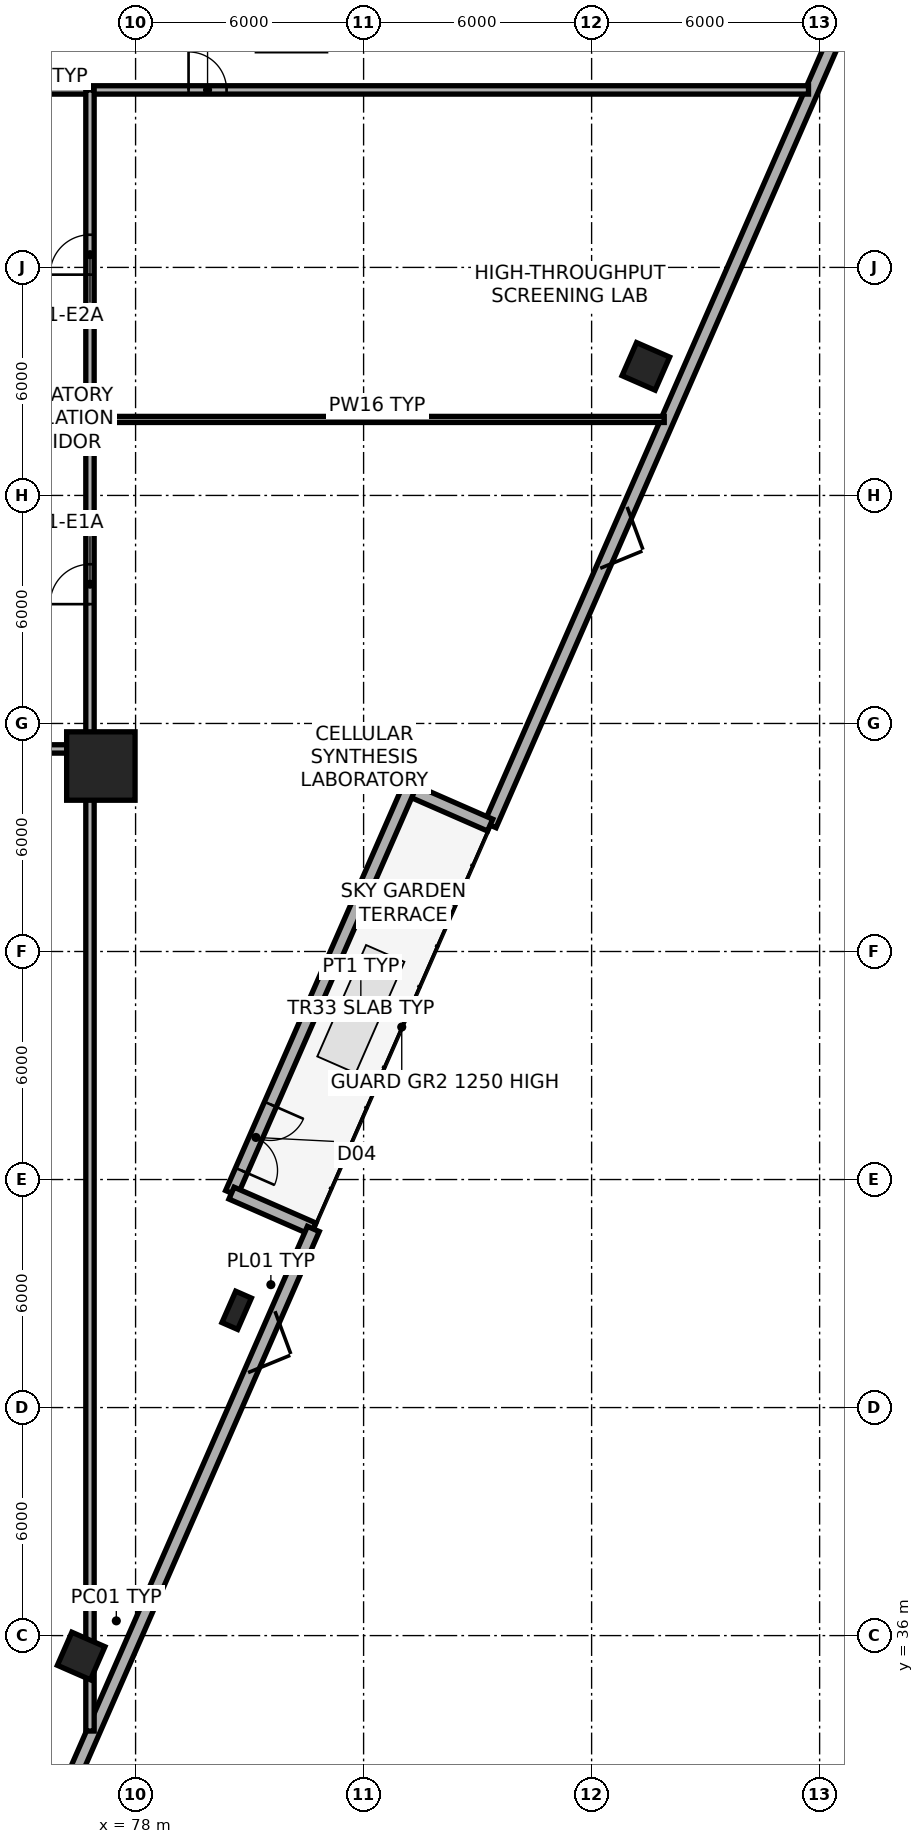
"""IFC4 building model, lengths in metres.
Left out: names, types, materials, properties, quantities, classifications, styles, units other than length and angle.
Written with IfcOpenShell. Run it as: python <this file> out.ifc"""

import sys

from ifc_helpers import new_model, si_unit, direction, frame, frame_2d, origin, origin_2d, place, context, subcontext, project, spatial, rectangle, extrude, element, fill, save


model = new_model("IFC4")
c1 = context("Model", 3, precision=1e-05, world=origin(), true_north=direction((0.0, 1.0)))
c2 = subcontext(c1, "Body", "Model", "MODEL_VIEW")
j1 = project(units=[si_unit("LENGTHUNIT", "METRE"), si_unit("PLANEANGLEUNIT", "RADIAN")], contexts=[c1])
p1 = place(None, origin())
s1 = spatial("IfcSite", under=j1, at=p1, CompositionType="ELEMENT")
p2 = place(p1, origin())
s2 = spatial("IfcBuilding", under=s1, at=p2, CompositionType="ELEMENT")
p3 = place(p2, frame((0.0, 0.0, 44.7)))
s3 = spatial("IfcBuildingStorey", under=s2, at=p3, CompositionType="ELEMENT", Elevation=44.7)
p4 = place(p3, frame((77.086, 58.88, 0.0), z_axis=(0.0, 0.0, 1.0), x_axis=(1.0, 0.0, 0.0)))
e1 = element("IfcColumn", 1, at=p4, inside=s3, PredefinedType="COLUMN", context=c2, shape_type="SweptSolid", body=[
    extrude(rectangle(XDim=1.8, YDim=1.8, at=origin_2d()), origin(), (0.0, 0.0, 1.0), 3.65),
])
p5 = place(p3, frame((76.591, 35.363, 0.003), z_axis=(-0.012375141264, 0.054450621561, 0.998439775695), x_axis=(-0.188482061822, -0.98074372261, 0.051149417712)))
e2 = element("IfcColumn", 2, at=p5, inside=s3, PredefinedType="COLUMN", context=c2, shape_type="SweptSolid", body=[
    extrude(rectangle(XDim=0.95, YDim=0.95, at=origin_2d()), origin(), (0.0, 0.0, 1.0), 3.65),
])
p6 = place(p3, frame((80.696, 44.489, 0.003), z_axis=(-0.019611953815, 0.038353752683, 0.999071749637), x_axis=(0.059488097101, -0.997448814212, 0.039459210974)))
e3 = element("IfcColumn", 3, at=p6, inside=s3, PredefinedType="PILASTER", context=c2, shape_type="SweptSolid", body=[
    extrude(rectangle(XDim=0.9, YDim=0.45, at=origin_2d()), origin(), (0.0, 0.0, 1.0), 3.647),
])
p7 = place(p3, frame((91.499, 69.406, 0.003), z_axis=(-0.039229493406, -0.00569028488, 0.999214024874), x_axis=(0.963398005451, -0.26560461156, 0.036310789174)))
e4 = element("IfcColumn", 4, at=p7, inside=s3, PredefinedType="COLUMN", context=c2, shape_type="SweptSolid", body=[
    extrude(rectangle(XDim=0.95, YDim=0.95, at=origin_2d()), origin(), (0.0, 0.0, 1.0), 3.647),
])
p8 = place(p3, frame((99.244, 84.535, 0.0), z_axis=(0.0, 0.0, 1.0), x_axis=(-0.401102097931, -0.916033354761, 0.0)))
e5 = element("IfcWall", 5, at=p8, inside=s3, PredefinedType="STANDARD", context=c2, shape_type="SweptSolid", body=[
    extrude(rectangle(XDim=29.703, YDim=0.34, at=frame_2d((14.852, 0.0))), origin(), (0.0, 0.0, 1.0), 0.85),
])
p9 = place(p3, frame((87.33, 57.326, 0.0), z_axis=(0.0, 0.0, 1.0), x_axis=(-0.916059542308, 0.401042285733, 0.0)))
e6 = element("IfcWall", 6, at=p9, inside=s3, PredefinedType="STANDARD", context=c2, shape_type="SweptSolid", body=[
    extrude(rectangle(XDim=2.35, YDim=0.34, at=frame_2d((1.175, 0.0))), origin(), (0.0, 0.0, 1.0), 2.505),
])
p10 = place(p3, frame((85.177, 58.268, 0.0), z_axis=(0.0, 0.0, 1.0), x_axis=(-0.401105876005, -0.916031700453, 0.0)))
e7 = element("IfcWall", 7, at=p10, inside=s3, PredefinedType="STANDARD", context=c2, shape_type="SweptSolid", body=[
    extrude(rectangle(XDim=11.6, YDim=0.34, at=frame_2d((5.8, 0.0))), origin(), (0.0, 0.0, 1.0), 3.375),
])
p11 = place(p10, frame((9.05, 0.0, 0.0)))
e8 = element("IfcOpeningElement", 8, at=p11, cuts=e7, PredefinedType="OPENING", context=c2, shape_type="SweptSolid", body=[
    extrude(rectangle(XDim=1.9, YDim=2.3, at=frame_2d((0.95, 1.15))), frame((0.0, 0.18, 0.0), z_axis=(0.0, -1.0, 0.0), x_axis=(1.0, 0.0, 0.0)), (0.0, 0.0, 1.0), 0.36),
])
p12 = place(p3, frame((80.525, 47.642, 0.0), z_axis=(0.0, 0.0, 1.0), x_axis=(0.916076250182, -0.401004119495, 0.0)))
e9 = element("IfcWall", 9, at=p12, inside=s3, PredefinedType="STANDARD", context=c2, shape_type="SweptSolid", body=[
    extrude(rectangle(XDim=2.35, YDim=0.34, at=frame_2d((1.175, 0.0))), origin(), (0.0, 0.0, 1.0), 2.505),
])
p13 = place(p3, frame((82.677, 46.7, 0.0), z_axis=(0.0, 0.0, 1.0), x_axis=(-0.401096058092, -0.916035999393, 0.0)))
e10 = element("IfcWall", 10, at=p13, inside=s3, PredefinedType="STANDARD", context=c2, shape_type="SweptSolid", body=[
    extrude(rectangle(XDim=29.704, YDim=0.34, at=frame_2d((14.852, 0.0))), origin(), (0.0, 0.0, 1.0), 0.85),
])
p14 = place(p3, frame((55.23, 76.67, 0.0), z_axis=(0.0, 0.0, 1.0), x_axis=(1.0, 0.0, 0.0)))
e11 = element("IfcWall", 11, at=p14, inside=s3, PredefinedType="PARTITIONING", context=c2, shape_type="SweptSolid", body=[
    extrude(rectangle(XDim=40.478, YDim=0.22, at=frame_2d((20.239, 0.0))), origin(), (0.0, 0.0, 1.0), 2.505),
])
p15 = place(p14, frame((4.33, 0.0, 0.0)))
e12 = element("IfcOpeningElement", 12, at=p15, cuts=e11, PredefinedType="OPENING", context=c2, shape_type="SweptSolid", body=[
    extrude(rectangle(XDim=0.98, YDim=2.1, at=frame_2d((0.49, 1.05))), frame((0.0, 0.12, 0.0), z_axis=(0.0, -1.0, 0.0), x_axis=(1.0, 0.0, 0.0)), (0.0, 0.0, 1.0), 0.24),
])
p16 = place(p14, frame((7.155, 0.0, 0.0)))
e13 = element("IfcOpeningElement", 13, at=p16, cuts=e11, PredefinedType="OPENING", context=c2, shape_type="SweptSolid", body=[
    extrude(rectangle(XDim=0.98, YDim=2.1, at=frame_2d((0.49, 1.05))), frame((0.0, 0.12, 0.0), z_axis=(0.0, -1.0, 0.0), x_axis=(1.0, 0.0, 0.0)), (0.0, 0.0, 1.0), 0.24),
])
p17 = place(p14, frame((24.164, 0.0, 0.0)))
e14 = element("IfcOpeningElement", 14, at=p17, cuts=e11, PredefinedType="OPENING", context=c2, shape_type="SweptSolid", body=[
    extrude(rectangle(XDim=1.0, YDim=2.1, at=frame_2d((0.5, 1.05))), frame((0.0, 0.12, 0.0), z_axis=(0.0, -1.0, 0.0), x_axis=(1.0, 0.0, 0.0)), (0.0, 0.0, 1.0), 0.24),
])
p18 = place(p3, frame((43.885, 59.33, 0.0), z_axis=(0.0, 0.0, 1.0), x_axis=(1.0, 0.0, 0.0)))
e15 = element("IfcWall", 15, at=p18, inside=s3, PredefinedType="PARTITIONING", context=c2, shape_type="SweptSolid", body=[
    extrude(rectangle(XDim=32.915, YDim=0.22, at=frame_2d((16.458, 0.0))), origin(), (0.0, 0.0, 1.0), 2.505),
])
p19 = place(p18, frame((6.921, 0.0, 0.0)))
e16 = element("IfcOpeningElement", 16, at=p19, cuts=e15, PredefinedType="OPENING", context=c2, shape_type="SweptSolid", body=[
    extrude(rectangle(XDim=1.5, YDim=2.2, at=frame_2d((0.75, 1.1))), frame((0.0, 0.12, 0.0), z_axis=(0.0, -1.0, 0.0), x_axis=(1.0, 0.0, 0.0)), (0.0, 0.0, 1.0), 0.24),
])
p20 = place(p18, frame((26.015, 0.0, 0.0)))
e17 = element("IfcOpeningElement", 17, at=p20, cuts=e15, PredefinedType="OPENING", context=c2, shape_type="SweptSolid", body=[
    extrude(rectangle(XDim=1.5, YDim=2.2, at=frame_2d((0.75, 1.1))), frame((0.0, 0.12, 0.0), z_axis=(0.0, -1.0, 0.0), x_axis=(1.0, 0.0, 0.0)), (0.0, 0.0, 1.0), 0.24),
])
p21 = place(p3, frame((76.8, 68.0, 0.0), z_axis=(0.0, 0.0, 1.0), x_axis=(1.0, 0.0, 0.0)))
e18 = element("IfcWall", 18, at=p21, inside=s3, PredefinedType="PARTITIONING", context=c2, shape_type="SweptSolid", body=[
    extrude(rectangle(XDim=15.111, YDim=0.16, at=frame_2d((7.556, 0.0))), origin(), (0.0, 0.0, 1.0), 2.505),
])
p22 = place(p3, frame((76.8, 33.489, 0.0), z_axis=(0.0, 0.0, 1.0), x_axis=(0.0, 1.0, 0.0)))
e19 = element("IfcWall", 19, at=p22, inside=s3, PredefinedType="PARTITIONING", context=c2, shape_type="SweptSolid", body=[
    extrude(rectangle(XDim=43.181, YDim=0.22, at=frame_2d((21.591, 0.0))), origin(), (0.0, 0.0, 1.0), 2.505),
])
p23 = place(p22, frame((29.651, 0.0, 0.0)))
e20 = element("IfcOpeningElement", 20, at=p23, cuts=e19, PredefinedType="OPENING", context=c2, shape_type="SweptSolid", body=[
    extrude(rectangle(XDim=1.05, YDim=2.15, at=frame_2d((0.525, 1.075))), frame((0.0, 0.12, 0.0), z_axis=(0.0, -1.0, 0.0), x_axis=(1.0, 0.0, 0.0)), (0.0, 0.0, 1.0), 0.24),
])
p24 = place(p22, frame((38.321, 0.0, 0.0)))
e21 = element("IfcOpeningElement", 21, at=p24, cuts=e19, PredefinedType="OPENING", context=c2, shape_type="SweptSolid", body=[
    extrude(rectangle(XDim=1.05, YDim=2.15, at=frame_2d((0.525, 1.075))), frame((0.0, 0.12, 0.0), z_axis=(0.0, -1.0, 0.0), x_axis=(1.0, 0.0, 0.0)), (0.0, 0.0, 1.0), 0.24),
])
p25 = place(p11, origin())
e22 = element("IfcDoor", 22, at=p25, inside=s3, OperationType="DOUBLE_DOOR_SINGLE_SWING", PredefinedType="DOOR", context=c2, shape_type="SweptSolid", body=[
    extrude(rectangle(XDim=1.9, YDim=2.3, at=frame_2d((0.95, 1.15))), frame((0.0, 0.025, 0.0), z_axis=(0.0, -1.0, 0.0), x_axis=(1.0, 0.0, 0.0)), (0.0, 0.0, 1.0), 0.05),
])
fill(e8, e22)
p26 = place(p17, origin())
e23 = element("IfcDoor", 23, at=p26, inside=s3, OperationType="SINGLE_SWING_LEFT", PredefinedType="DOOR", context=c2, shape_type="SweptSolid", body=[
    extrude(rectangle(XDim=1.0, YDim=2.1, at=frame_2d((0.5, 1.05))), frame((0.0, 0.025, 0.0), z_axis=(0.0, -1.0, 0.0), x_axis=(1.0, 0.0, 0.0)), (0.0, 0.0, 1.0), 0.05),
])
fill(e14, e23)
p27 = place(p23, origin())
e24 = element("IfcDoor", 24, at=p27, inside=s3, OperationType="SINGLE_SWING_LEFT", PredefinedType="DOOR", context=c2, shape_type="SweptSolid", body=[
    extrude(rectangle(XDim=1.05, YDim=2.15, at=frame_2d((0.525, 1.075))), frame((0.0, 0.025, 0.0), z_axis=(0.0, -1.0, 0.0), x_axis=(1.0, 0.0, 0.0)), (0.0, 0.0, 1.0), 0.05),
])
fill(e20, e24)
p28 = place(p24, origin())
e25 = element("IfcDoor", 25, at=p28, inside=s3, OperationType="SINGLE_SWING_LEFT", PredefinedType="DOOR", context=c2, shape_type="SweptSolid", body=[
    extrude(rectangle(XDim=1.05, YDim=2.15, at=frame_2d((0.525, 1.075))), frame((0.0, 0.025, 0.0), z_axis=(0.0, -1.0, 0.0), x_axis=(1.0, 0.0, 0.0)), (0.0, 0.0, 1.0), 0.05),
])
fill(e21, e25)
save(model, sys.argv[1])
